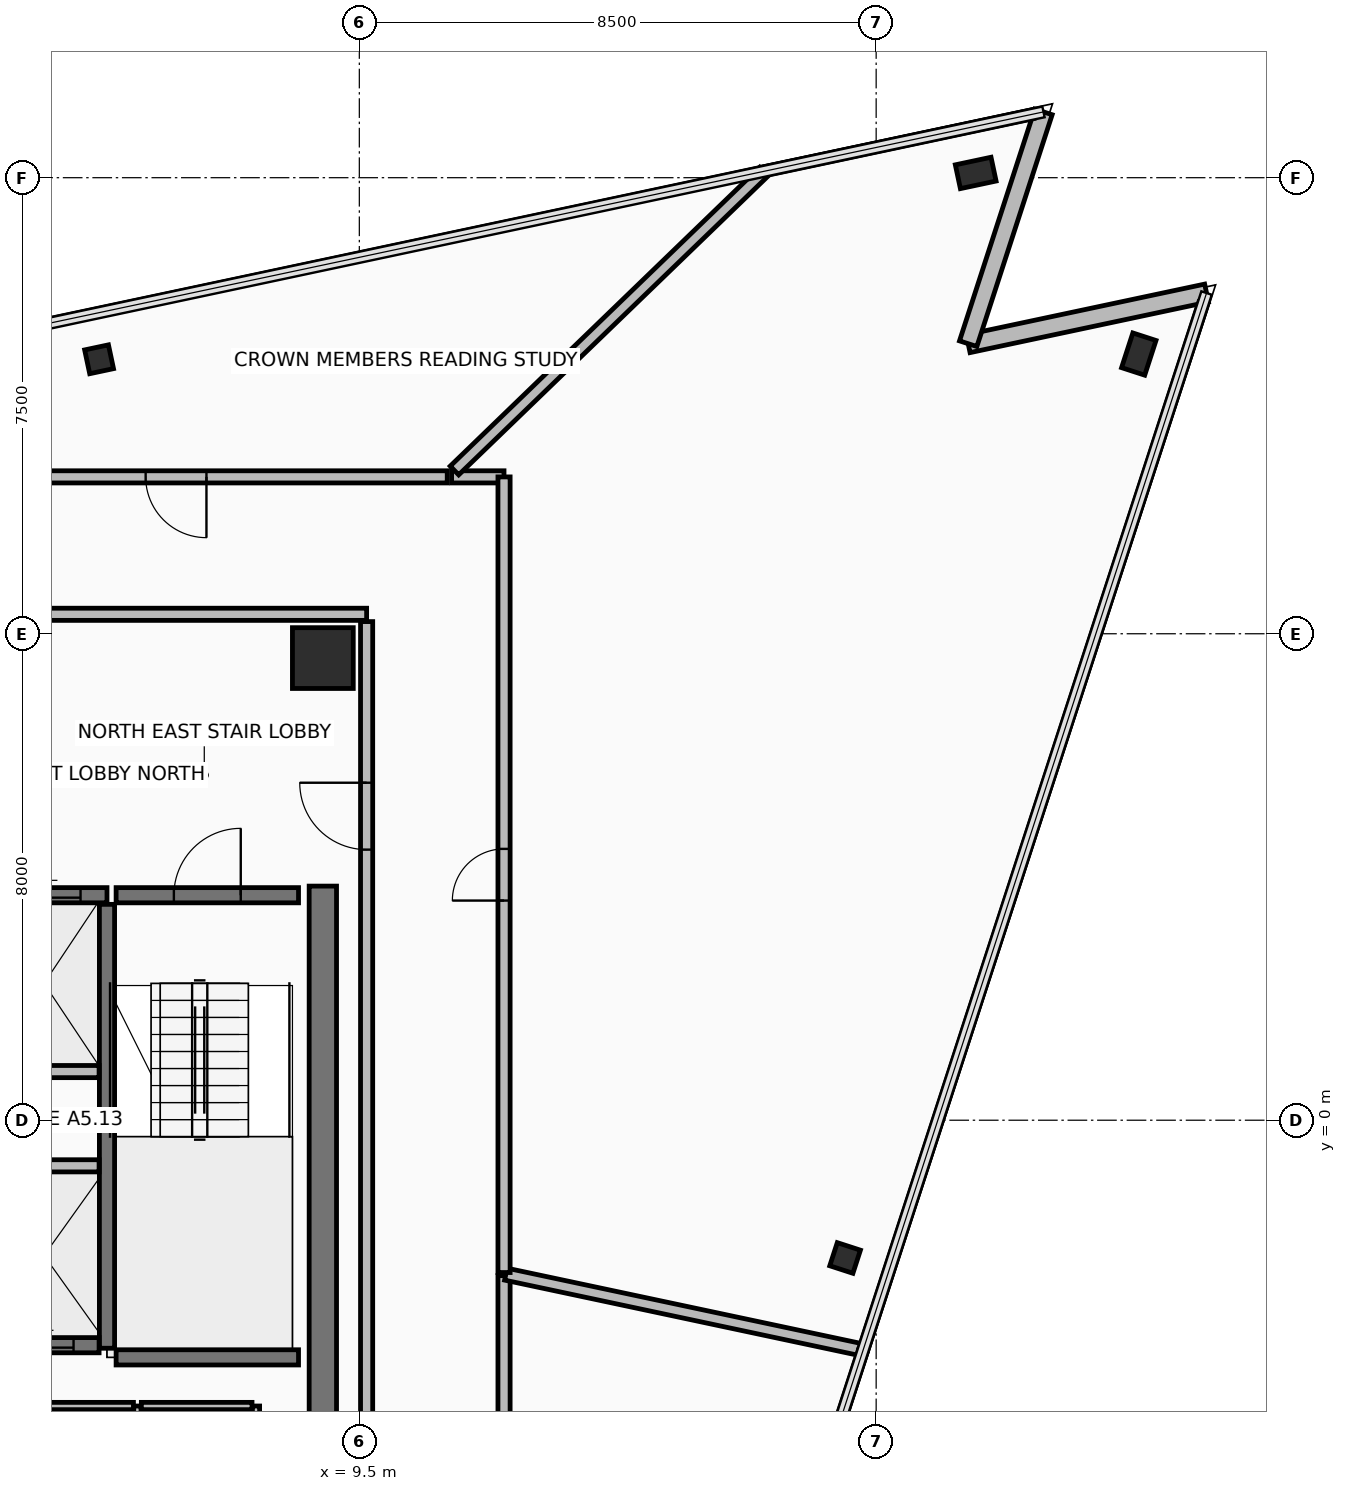
"""IFC4 building model, lengths in metres.
Left out: names, types, materials, properties, quantities, classifications, styles, units other than length and angle.
Written with IfcOpenShell. Run it as: python <this file> out.ifc"""

import sys

from ifc_helpers import new_model, si_unit, direction, frame, frame_2d, origin, origin_2d, place, context, subcontext, project, spatial, rectangle, hollow_rectangle, extrude, element, fill, save


model = new_model("IFC4")
c1 = context("Model", 3, precision=1e-05, world=origin(), true_north=direction((0.0, 1.0)))
c2 = subcontext(c1, "Body", "Model", "MODEL_VIEW")
j1 = project(units=[si_unit("LENGTHUNIT", "METRE"), si_unit("PLANEANGLEUNIT", "RADIAN")], contexts=[c1])
p1 = place(None, origin())
s1 = spatial("IfcSite", under=j1, at=p1, CompositionType="ELEMENT")
p2 = place(p1, origin())
s2 = spatial("IfcBuilding", under=s1, at=p2, CompositionType="ELEMENT")
p3 = place(p2, frame((0.0, 0.0, 283.4)))
s3 = spatial("IfcBuildingStorey", under=s2, at=p3, CompositionType="ELEMENT", Elevation=283.4)
p4 = place(p3, frame((8.9, 7.6, 0.0), z_axis=(0.0, 0.0, 1.0), x_axis=(1.0, 0.0, 0.0)))
e1 = element("IfcColumn", 1, at=p4, inside=s3, PredefinedType="COLUMN", context=c2, shape_type="SweptSolid", body=[
    extrude(rectangle(XDim=1.0, YDim=1.0, at=origin_2d()), origin(), (0.0, 0.0, 1.0), 3.65),
])
p5 = place(p3, frame((17.489, -2.265, 0.0), z_axis=(0.0, 0.0, 1.0), x_axis=(0.309018654281, 0.951055976957, 0.0)))
e2 = element("IfcColumn", 2, at=p5, inside=s3, PredefinedType="COLUMN", context=c2, shape_type="SweptSolid", body=[
    extrude(hollow_rectangle(XDim=0.4, YDim=0.4, WallThickness=0.025, at=origin_2d()), origin(), (0.0, 0.0, 1.0), 3.65),
])
for number, where, z_axis, x_axis in (
    (3, (22.319, 12.6, 0.0), (0.0, 0.0, 1.0), (0.309, 0.951, 0.0)),
    (4, (19.637, 15.578, 0.0), (0.0, 0.0, 1.0), (0.978, 0.208, 0.0)),
):
    element("IfcColumn", number, at=place(p3, frame(where, z_axis=z_axis, x_axis=x_axis)), inside=s3, PredefinedType="COLUMN", context=c2, shape_type="SweptSolid", body=[
        extrude(hollow_rectangle(XDim=0.4, YDim=0.6, WallThickness=0.03, at=origin_2d()), origin(), (0.0, 0.0, 1.0), 3.65),
    ])
p6 = place(p3, frame((5.22, 12.514, 0.0), z_axis=(0.0, 0.0, 1.0), x_axis=(0.978147237858, 0.207913398007, 0.0)))
e5 = element("IfcColumn", 5, at=p6, inside=s3, PredefinedType="COLUMN", context=c2, shape_type="SweptSolid", body=[
    extrude(hollow_rectangle(XDim=0.4, YDim=0.4, WallThickness=0.025, at=origin_2d()), origin(), (0.0, 0.0, 1.0), 3.65),
])
p7 = place(p3, frame((23.434, 13.603, 0.0), z_axis=(0.0, 0.0, 1.0), x_axis=(-0.97815049033, -0.207898095871, 0.0)))
e6 = element("IfcWall", 6, at=p7, inside=s3, PredefinedType="STANDARD", context=c2, shape_type="SweptSolid", body=[
    extrude(rectangle(XDim=4.008, YDim=0.3, at=frame_2d((2.004, 0.0))), origin(), (0.0, 0.0, 1.0), 2.81),
])
p8 = place(p3, frame((19.513, 12.77, 0.0), z_axis=(0.0, 0.0, 1.0), x_axis=(0.309018580232, 0.951056001018, 0.0)))
e7 = element("IfcWall", 7, at=p8, inside=s3, PredefinedType="STANDARD", context=c2, shape_type="SweptSolid", body=[
    extrude(rectangle(XDim=4.008, YDim=0.3, at=frame_2d((2.004, 0.0))), origin(), (0.0, 0.0, 1.0), 2.81),
])
p9 = place(p3, frame((8.9, -6.85, 0.0), z_axis=(0.0, 0.0, 1.0), x_axis=(0.0, 1.0, 0.0)))
e8 = element("IfcWall", 8, at=p9, inside=s3, PredefinedType="SHEAR", context=c2, shape_type="SweptSolid", body=[
    extrude(rectangle(XDim=10.7, YDim=0.45, at=frame_2d((5.35, 0.0))), origin(), (0.0, 0.0, 1.0), 3.465),
])
p10 = place(p3, frame((9.62, 8.32, 0.0), z_axis=(0.0, 0.0, 1.0), x_axis=(-1.0, 0.0, 0.0)))
e9 = element("IfcWall", 9, at=p10, inside=s3, PredefinedType="PARTITIONING", context=c2, shape_type="SweptSolid", body=[
    extrude(rectangle(XDim=19.24, YDim=0.2, at=frame_2d((9.62, 0.0))), origin(), (0.0, 0.0, 1.0), 2.96),
])
p11 = place(p10, frame((8.67, 0.0, 0.0)))
e10 = element("IfcOpeningElement", 10, at=p11, cuts=e9, PredefinedType="OPENING", context=c2, shape_type="SweptSolid", body=[
    extrude(rectangle(XDim=0.9, YDim=2.1, at=frame_2d((0.45, 1.05))), frame((0.0, 0.11, 0.0), z_axis=(0.0, -1.0, 0.0), x_axis=(1.0, 0.0, 0.0)), (0.0, 0.0, 1.0), 0.22),
])
p12 = place(p10, frame((15.745, 0.0, 0.0)))
e11 = element("IfcOpeningElement", 11, at=p12, cuts=e9, PredefinedType="OPENING", context=c2, shape_type="SweptSolid", body=[
    extrude(rectangle(XDim=0.9, YDim=2.1, at=frame_2d((0.45, 1.05))), frame((0.0, 0.11, 0.0), z_axis=(0.0, -1.0, 0.0), x_axis=(1.0, 0.0, 0.0)), (0.0, 0.0, 1.0), 0.22),
])
p13 = place(p10, frame((13.795, 0.0, 0.0)))
e12 = element("IfcOpeningElement", 12, at=p13, cuts=e9, PredefinedType="OPENING", context=c2, shape_type="SweptSolid", body=[
    extrude(rectangle(XDim=0.9, YDim=2.1, at=frame_2d((0.45, 1.05))), frame((0.0, 0.11, 0.0), z_axis=(0.0, -1.0, 0.0), x_axis=(1.0, 0.0, 0.0)), (0.0, 0.0, 1.0), 0.22),
])
p14 = place(p3, frame((9.62, -8.2, 0.0), z_axis=(0.0, 0.0, 1.0), x_axis=(0.0, 1.0, 0.0)))
e13 = element("IfcWall", 13, at=p14, inside=s3, PredefinedType="PARTITIONING", context=c2, shape_type="SweptSolid", body=[
    extrude(rectangle(XDim=16.4, YDim=0.2, at=frame_2d((8.2, 0.0))), origin(), (0.0, 0.0, 1.0), 2.96),
])
p15 = place(p14, frame((12.65, 0.0, 0.0)))
e14 = element("IfcOpeningElement", 14, at=p15, cuts=e13, PredefinedType="OPENING", context=c2, shape_type="SweptSolid", body=[
    extrude(rectangle(XDim=1.1, YDim=2.15, at=frame_2d((0.55, 1.075))), frame((0.0, 0.11, 0.0), z_axis=(0.0, -1.0, 0.0), x_axis=(1.0, 0.0, 0.0)), (0.0, 0.0, 1.0), 0.22),
])
p16 = place(p3, frame((5.35, -3.75, 0.0), z_axis=(0.0, 0.0, 1.0), x_axis=(0.0, 1.0, 0.0)))
e15 = element("IfcWall", 15, at=p16, inside=s3, PredefinedType="SHEAR", context=c2, shape_type="SweptSolid", body=[
    extrude(rectangle(XDim=7.3, YDim=0.25, at=frame_2d((3.65, 0.0))), origin(), (0.0, 0.0, 1.0), 3.465),
])
p17 = place(p3, frame((5.5, 3.7, 0.0), z_axis=(0.0, 0.0, 1.0), x_axis=(1.0, 0.0, 0.0)))
e16 = element("IfcWall", 16, at=p17, inside=s3, PredefinedType="SHEAR", context=c2, shape_type="SweptSolid", body=[
    extrude(rectangle(XDim=3.0, YDim=0.25, at=frame_2d((1.5, 0.0))), origin(), (0.0, 0.0, 1.0), 3.465),
])
p18 = place(p17, frame((0.95, 0.0, 0.0)))
e17 = element("IfcOpeningElement", 17, at=p18, cuts=e16, PredefinedType="OPENING", context=c2, shape_type="SweptSolid", body=[
    extrude(rectangle(XDim=1.1, YDim=2.15, at=frame_2d((0.55, 1.075))), frame((0.0, 0.135, 0.0), z_axis=(0.0, -1.0, 0.0), x_axis=(1.0, 0.0, 0.0)), (0.0, 0.0, 1.0), 0.27),
])
p19 = place(p3, frame((5.5, -3.9, 0.0), z_axis=(0.0, 0.0, 1.0), x_axis=(1.0, 0.0, 0.0)))
e18 = element("IfcWall", 18, at=p19, inside=s3, PredefinedType="SHEAR", context=c2, shape_type="SweptSolid", body=[
    extrude(rectangle(XDim=3.0, YDim=0.25, at=frame_2d((1.5, 0.0))), origin(), (0.0, 0.0, 1.0), 3.465),
])
p20 = place(p3, frame((3.28, 3.7, 0.0), z_axis=(0.0, 0.0, 1.0), x_axis=(1.0, 0.0, 0.0)))
e19 = element("IfcWall", 19, at=p20, inside=s3, PredefinedType="SHEAR", context=c2, shape_type="SweptSolid", body=[
    extrude(rectangle(XDim=2.07, YDim=0.25, at=frame_2d((1.035, 0.0))), origin(), (0.0, 0.0, 1.0), 3.465),
])
p21 = place(p20, frame((0.435, 0.0, 0.0)))
e20 = element("IfcOpeningElement", 20, at=p21, cuts=e19, PredefinedType="OPENING", context=c2, shape_type="SweptSolid", body=[
    extrude(rectangle(XDim=1.2, YDim=2.2, at=frame_2d((0.6, 1.1))), frame((0.0, 0.135, 0.0), z_axis=(0.0, -1.0, 0.0), x_axis=(1.0, 0.0, 0.0)), (0.0, 0.0, 1.0), 0.27),
])
p22 = place(p3, frame((3.385, 0.8, 0.0), z_axis=(0.0, 0.0, 1.0), x_axis=(1.0, 0.0, 0.0)))
e21 = element("IfcWall", 21, at=p22, inside=s3, PredefinedType="PARTITIONING", context=c2, shape_type="SweptSolid", body=[
    extrude(rectangle(XDim=1.835, YDim=0.2, at=frame_2d((0.917, 0.0))), origin(), (0.0, 0.0, 1.0), 3.465),
])
p23 = place(p3, frame((3.28, -3.7, 0.0), z_axis=(0.0, 0.0, 1.0), x_axis=(1.0, 0.0, 0.0)))
e22 = element("IfcWall", 22, at=p23, inside=s3, PredefinedType="SHEAR", context=c2, shape_type="SweptSolid", body=[
    extrude(rectangle(XDim=1.94, YDim=0.25, at=frame_2d((0.97, 0.0))), origin(), (0.0, 0.0, 1.0), 3.465),
])
p24 = place(p23, frame((0.42, 0.0, 0.0)))
e23 = element("IfcOpeningElement", 23, at=p24, cuts=e22, PredefinedType="OPENING", context=c2, shape_type="SweptSolid", body=[
    extrude(rectangle(XDim=1.1, YDim=2.2, at=frame_2d((0.55, 1.1))), frame((0.0, 0.135, 0.0), z_axis=(0.0, -1.0, 0.0), x_axis=(1.0, 0.0, 0.0)), (0.0, 0.0, 1.0), 0.27),
])
p25 = place(p3, frame((3.385, -0.75, 0.0), z_axis=(0.0, 0.0, 1.0), x_axis=(1.0, 0.0, 0.0)))
e24 = element("IfcWall", 24, at=p25, inside=s3, PredefinedType="PARTITIONING", context=c2, shape_type="SweptSolid", body=[
    extrude(rectangle(XDim=1.835, YDim=0.2, at=frame_2d((0.917, 0.0))), origin(), (0.0, 0.0, 1.0), 3.465),
])
p26 = place(p3, frame((5.85, -8.215, 0.0), z_axis=(0.0, 0.0, 1.0), x_axis=(0.0, 1.0, 0.0)))
e25 = element("IfcWall", 25, at=p26, inside=s3, PredefinedType="PARTITIONING", context=c2, shape_type="SweptSolid", body=[
    extrude(rectangle(XDim=3.515, YDim=0.12, at=frame_2d((1.758, 0.0))), origin(), (0.0, 0.0, 1.0), 2.76),
])
p27 = place(p3, frame((5.785, -4.7, 0.0), z_axis=(0.0, 0.0, 1.0), x_axis=(-1.0, 0.0, 0.0)))
e26 = element("IfcWall", 26, at=p27, inside=s3, PredefinedType="PARTITIONING", context=c2, shape_type="SweptSolid", body=[
    extrude(rectangle(XDim=1.885, YDim=0.12, at=frame_2d((0.942, 0.0))), origin(), (0.0, 0.0, 1.0), 3.465),
])
p28 = place(p3, frame((7.8, -8.215, 0.0), z_axis=(0.0, 0.0, 1.0), x_axis=(0.0, 1.0, 0.0)))
e27 = element("IfcWall", 27, at=p28, inside=s3, PredefinedType="PARTITIONING", context=c2, shape_type="SweptSolid", body=[
    extrude(rectangle(XDim=3.515, YDim=0.12, at=frame_2d((1.758, 0.0))), origin(), (0.0, 0.0, 1.0), 2.76),
])
p29 = place(p3, frame((7.735, -4.7, 0.0), z_axis=(0.0, 0.0, 1.0), x_axis=(-1.0, 0.0, 0.0)))
e28 = element("IfcWall", 28, at=p29, inside=s3, PredefinedType="PARTITIONING", context=c2, shape_type="SweptSolid", body=[
    extrude(rectangle(XDim=1.82, YDim=0.12, at=frame_2d((0.91, 0.0))), origin(), (0.0, 0.0, 1.0), 3.465),
])
p30 = place(p3, frame((11.88, -10.579, 0.0), z_axis=(0.0, 0.0, 1.0), x_axis=(0.0, 1.0, 0.0)))
e29 = element("IfcWall", 29, at=p30, inside=s3, PredefinedType="PARTITIONING", context=c2, shape_type="SweptSolid", body=[
    extrude(rectangle(XDim=8.023, YDim=0.2, at=frame_2d((4.012, 0.0))), origin(), (0.0, 0.0, 1.0), 2.96),
])
p31 = place(p3, frame((11.91, -2.531, 0.0), z_axis=(0.0, 0.0, 1.0), x_axis=(0.978144111738, -0.207928104574, 0.0)))
e30 = element("IfcWall", 30, at=p31, inside=s3, PredefinedType="PARTITIONING", context=c2, shape_type="SweptSolid", body=[
    extrude(rectangle(XDim=5.979, YDim=0.2, at=frame_2d((2.989, 0.0))), origin(), (0.0, 0.0, 1.0), 2.81),
])
p32 = place(p3, frame((17.777, -3.807, 0.0), z_axis=(0.0, 0.0, 1.0), x_axis=(-0.309024581215, -0.951054051148, 0.0)))
e31 = element("IfcWall", 31, at=p32, inside=s3, PredefinedType="PARTITIONING", context=c2, shape_type="SweptSolid", body=[
    extrude(rectangle(XDim=30.614, YDim=0.15, at=frame_2d((15.307, 0.0))), origin(), (0.0, 0.0, 1.0), 3.465),
])
p33 = place(p3, frame((11.879, 10.58, 0.0), z_axis=(0.0, 0.0, 1.0), x_axis=(-1.0, 0.0, 0.0)))
e32 = element("IfcWall", 32, at=p33, inside=s3, PredefinedType="PARTITIONING", context=c2, shape_type="SweptSolid", body=[
    extrude(rectangle(XDim=0.862, YDim=0.2, at=frame_2d((0.431, 0.0))), origin(), (0.0, 0.0, 1.0), 3.465),
])
p34 = place(p3, frame((11.065, 10.685, 0.0), z_axis=(0.0, 0.0, 1.0), x_axis=(0.719349741171, 0.694648076278, 0.0)))
e33 = element("IfcWall", 33, at=p34, inside=s3, PredefinedType="PARTITIONING", context=c2, shape_type="SweptSolid", body=[
    extrude(rectangle(XDim=7.077, YDim=0.2, at=frame_2d((3.538, 0.0))), origin(), (0.0, 0.0, 1.0), 2.81),
])
p35 = place(p3, frame((16.167, 15.607, 0.0), z_axis=(0.0, 0.0, 1.0), x_axis=(0.978147425174, 0.207912516762, 0.0)))
e34 = element("IfcWall", 34, at=p35, inside=s3, PredefinedType="PARTITIONING", context=c2, shape_type="SweptSolid", body=[
    extrude(rectangle(XDim=4.508, YDim=0.15, at=frame_2d((2.254, 0.0))), origin(), (0.0, 0.0, 1.0), 3.465),
])
p36 = place(p3, frame((23.379, 13.433, 0.0), z_axis=(0.0, 0.0, 1.0), x_axis=(-0.309022856951, -0.951054611409, 0.0)))
e35 = element("IfcWall", 35, at=p36, inside=s3, PredefinedType="PARTITIONING", context=c2, shape_type="SweptSolid", body=[
    extrude(rectangle(XDim=18.077, YDim=0.15, at=frame_2d((9.039, 0.0))), origin(), (0.0, 0.0, 1.0), 3.465),
])
p37 = place(p3, frame((11.88, -2.505, 0.0), z_axis=(0.0, 0.0, 1.0), x_axis=(0.0, 1.0, 0.0)))
e36 = element("IfcWall", 36, at=p37, inside=s3, PredefinedType="PARTITIONING", context=c2, shape_type="SweptSolid", body=[
    extrude(rectangle(XDim=13.084, YDim=0.2, at=frame_2d((6.542, 0.0))), origin(), (0.0, 0.0, 1.0), 2.96),
])
p38 = place(p37, frame((6.117, 0.0, 0.0)))
e37 = element("IfcOpeningElement", 37, at=p38, cuts=e36, PredefinedType="OPENING", context=c2, shape_type="SweptSolid", body=[
    extrude(rectangle(XDim=0.85, YDim=2.1, at=frame_2d((0.425, 1.05))), frame((0.0, 0.11, 0.0), z_axis=(0.0, -1.0, 0.0), x_axis=(1.0, 0.0, 0.0)), (0.0, 0.0, 1.0), 0.22),
])
p39 = place(p3, frame((10.946, 10.58, 0.0), z_axis=(0.0, 0.0, 1.0), x_axis=(-1.0, 0.0, 0.0)))
e38 = element("IfcWall", 38, at=p39, inside=s3, PredefinedType="PARTITIONING", context=c2, shape_type="SweptSolid", body=[
    extrude(rectangle(XDim=8.921, YDim=0.2, at=frame_2d((4.46, 0.0))), origin(), (0.0, 0.0, 1.0), 2.96),
])
p40 = place(p39, frame((3.96, 0.0, 0.0)))
e39 = element("IfcOpeningElement", 39, at=p40, cuts=e38, PredefinedType="OPENING", context=c2, shape_type="SweptSolid", body=[
    extrude(rectangle(XDim=1.0, YDim=2.15, at=frame_2d((0.5, 1.075))), frame((0.0, 0.11, 0.0), z_axis=(0.0, -1.0, 0.0), x_axis=(1.0, 0.0, 0.0)), (0.0, 0.0, 1.0), 0.22),
])
p41 = place(p15, frame((1.1, 0.0, 0.0), z_axis=(0.0, 0.0, 1.0), x_axis=(-1.0, 0.0, 0.0)))
e40 = element("IfcDoor", 40, at=p41, inside=s3, OperationType="SINGLE_SWING_LEFT", PredefinedType="DOOR", context=c2, shape_type="SweptSolid", body=[
    extrude(rectangle(XDim=1.1, YDim=2.15, at=frame_2d((0.55, 1.075))), frame((0.0, 0.025, 0.0), z_axis=(0.0, -1.0, 0.0), x_axis=(1.0, 0.0, 0.0)), (0.0, 0.0, 1.0), 0.05),
])
fill(e14, e40)
p42 = place(p18, frame((1.1, 0.0, 0.0), z_axis=(0.0, 0.0, 1.0), x_axis=(-1.0, 0.0, 0.0)))
e41 = element("IfcDoor", 41, at=p42, inside=s3, OperationType="SINGLE_SWING_LEFT", PredefinedType="DOOR", context=c2, shape_type="SweptSolid", body=[
    extrude(rectangle(XDim=1.1, YDim=2.15, at=frame_2d((0.55, 1.075))), frame((0.0, 0.025, 0.0), z_axis=(0.0, -1.0, 0.0), x_axis=(1.0, 0.0, 0.0)), (0.0, 0.0, 1.0), 0.05),
])
fill(e17, e41)
p43 = place(p21, origin())
e42 = element("IfcDoor", 42, at=p43, inside=s3, OperationType="SLIDING_TO_RIGHT", PredefinedType="DOOR", context=c2, shape_type="SweptSolid", body=[
    extrude(rectangle(XDim=1.2, YDim=2.2, at=frame_2d((0.6, 1.1))), frame((0.0, 0.025, 0.0), z_axis=(0.0, -1.0, 0.0), x_axis=(1.0, 0.0, 0.0)), (0.0, 0.0, 1.0), 0.05),
])
fill(e20, e42)
p44 = place(p24, origin())
e43 = element("IfcDoor", 43, at=p44, inside=s3, OperationType="SLIDING_TO_LEFT", PredefinedType="DOOR", context=c2, shape_type="SweptSolid", body=[
    extrude(rectangle(XDim=1.1, YDim=2.2, at=frame_2d((0.55, 1.1))), frame((0.0, 0.025, 0.0), z_axis=(0.0, -1.0, 0.0), x_axis=(1.0, 0.0, 0.0)), (0.0, 0.0, 1.0), 0.05),
])
fill(e23, e43)
p45 = place(p38, origin())
e44 = element("IfcDoor", 44, at=p45, inside=s3, OperationType="SINGLE_SWING_RIGHT", PredefinedType="DOOR", context=c2, shape_type="SweptSolid", body=[
    extrude(rectangle(XDim=0.85, YDim=2.1, at=frame_2d((0.425, 1.05))), frame((0.0, 0.025, 0.0), z_axis=(0.0, -1.0, 0.0), x_axis=(1.0, 0.0, 0.0)), (0.0, 0.0, 1.0), 0.05),
])
fill(e37, e44)
p46 = place(p40, origin())
e45 = element("IfcDoor", 45, at=p46, inside=s3, OperationType="SINGLE_SWING_RIGHT", PredefinedType="DOOR", context=c2, shape_type="SweptSolid", body=[
    extrude(rectangle(XDim=1.0, YDim=2.15, at=frame_2d((0.5, 1.075))), frame((0.0, 0.025, 0.0), z_axis=(0.0, -1.0, 0.0), x_axis=(1.0, 0.0, 0.0)), (0.0, 0.0, 1.0), 0.05),
])
fill(e39, e45)
save(model, sys.argv[1])
